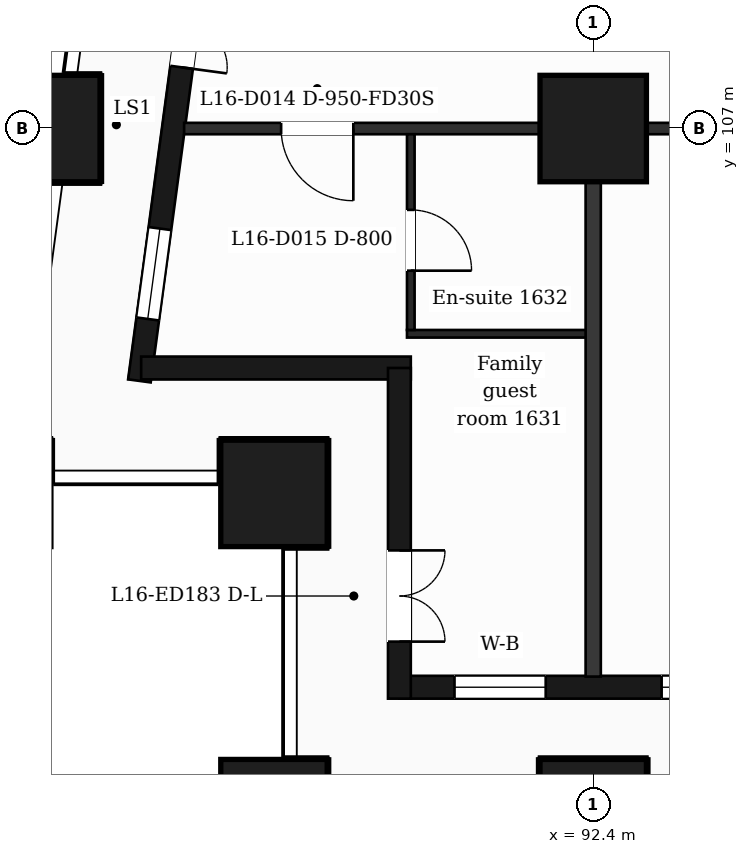
"""IFC4 building model, lengths in metres.
Left out: names, types, materials, properties, quantities, classifications, styles, units other than length and angle.
Written with IfcOpenShell. Run it as: python <this file> out.ifc"""

import sys

from ifc_helpers import new_model, si_unit, direction, frame, frame_2d, origin, origin_2d, place, context, subcontext, project, spatial, rectangle, extrude, element, fill, save


model = new_model("IFC4")
c1 = context("Model", 3, precision=1e-05, world=origin(), true_north=direction((0.0, 1.0)))
c2 = subcontext(c1, "Body", "Model", "MODEL_VIEW")
j1 = project(units=[si_unit("LENGTHUNIT", "METRE"), si_unit("PLANEANGLEUNIT", "RADIAN")], contexts=[c1])
p1 = place(None, origin())
s1 = spatial("IfcSite", under=j1, at=p1, CompositionType="ELEMENT")
p2 = place(p1, origin())
s2 = spatial("IfcBuilding", under=s1, at=p2, CompositionType="ELEMENT")
p3 = place(p2, frame((0.0, 0.0, 74.0)))
s3 = spatial("IfcBuildingStorey", under=s2, at=p3, CompositionType="ELEMENT", Elevation=74.0)
for number, where, z_axis, x_axis in (
    (1, (92.4, 98.0, 0.0), (0.0, 0.0, 1.0), (1.0, 0.0, 0.0)),
    (2, (88.2, 98.0, 0.0), (0.0, 0.0, 1.0), (1.0, 0.0, 0.0)),
    (3, (88.2, 102.2, 0.0), (0.0, 0.0, 1.0), (1.0, 0.0, 0.0)),
    (4, (92.4, 107.0, 0.0), (0.0, 0.0, 1.0), (1.0, 0.0, 0.0)),
    (5, (85.211, 107.0, 0.0), (0.0, 0.0, 1.0), (1.0, 0.0, 0.0)),
):
    element("IfcColumn", number, at=place(p3, frame(where, z_axis=z_axis, x_axis=x_axis)), inside=s3, PredefinedType="COLUMN", context=c2, shape_type="SweptSolid", body=[
        extrude(rectangle(XDim=1.4, YDim=1.4, at=origin_2d()), origin(), (0.0, 0.0, 1.0), 3.5),
    ])
p4 = place(p3, frame((89.85, 99.65, 0.0), z_axis=(0.0, 0.0, 1.0), x_axis=(1.0, 0.0, 0.0)))
e6 = element("IfcWall", 6, at=p4, inside=s3, PredefinedType="SOLIDWALL", context=c2, shape_type="SweptSolid", body=[
    extrude(rectangle(XDim=47.25, YDim=0.3, at=frame_2d((23.625, 0.0))), origin(), (0.0, 0.0, 1.0), 3.18),
])
p5 = place(p4, frame((0.725, 0.0, 0.9)))
e7 = element("IfcOpeningElement", 7, at=p5, cuts=e6, PredefinedType="OPENING", context=c2, shape_type="SweptSolid", body=[
    extrude(rectangle(XDim=1.2, YDim=2.1, at=frame_2d((0.6, 1.05))), frame((0.0, 0.16, 0.0), z_axis=(0.0, -1.0, 0.0), x_axis=(1.0, 0.0, 0.0)), (0.0, 0.0, 1.0), 0.32),
])
p6 = place(p4, frame((3.45, 0.0, 0.9)))
e8 = element("IfcOpeningElement", 8, at=p6, cuts=e6, PredefinedType="OPENING", context=c2, shape_type="SweptSolid", body=[
    extrude(rectangle(XDim=2.4, YDim=2.1, at=frame_2d((1.2, 1.05))), frame((0.0, 0.16, 0.0), z_axis=(0.0, -1.0, 0.0), x_axis=(1.0, 0.0, 0.0)), (0.0, 0.0, 1.0), 0.32),
])
p7 = place(p4, frame((7.65, 0.0, 0.9)))
e9 = element("IfcOpeningElement", 9, at=p7, cuts=e6, PredefinedType="OPENING", context=c2, shape_type="SweptSolid", body=[
    extrude(rectangle(XDim=2.4, YDim=2.1, at=frame_2d((1.2, 1.05))), frame((0.0, 0.16, 0.0), z_axis=(0.0, -1.0, 0.0), x_axis=(1.0, 0.0, 0.0)), (0.0, 0.0, 1.0), 0.32),
])
p8 = place(p4, frame((12.45, 0.0, 0.9)))
e10 = element("IfcOpeningElement", 10, at=p8, cuts=e6, PredefinedType="OPENING", context=c2, shape_type="SweptSolid", body=[
    extrude(rectangle(XDim=1.2, YDim=2.1, at=frame_2d((0.6, 1.05))), frame((0.0, 0.16, 0.0), z_axis=(0.0, -1.0, 0.0), x_axis=(1.0, 0.0, 0.0)), (0.0, 0.0, 1.0), 0.32),
])
p9 = place(p4, frame((16.65, 0.0, 0.9)))
e11 = element("IfcOpeningElement", 11, at=p9, cuts=e6, PredefinedType="OPENING", context=c2, shape_type="SweptSolid", body=[
    extrude(rectangle(XDim=1.2, YDim=2.1, at=frame_2d((0.6, 1.05))), frame((0.0, 0.16, 0.0), z_axis=(0.0, -1.0, 0.0), x_axis=(1.0, 0.0, 0.0)), (0.0, 0.0, 1.0), 0.32),
])
p10 = place(p4, frame((19.95, 0.0, 0.9)))
e12 = element("IfcOpeningElement", 12, at=p10, cuts=e6, PredefinedType="OPENING", context=c2, shape_type="SweptSolid", body=[
    extrude(rectangle(XDim=1.2, YDim=2.1, at=frame_2d((0.6, 1.05))), frame((0.0, 0.16, 0.0), z_axis=(0.0, -1.0, 0.0), x_axis=(1.0, 0.0, 0.0)), (0.0, 0.0, 1.0), 0.32),
])
p11 = place(p4, frame((21.75, 0.0, 0.9)))
e13 = element("IfcOpeningElement", 13, at=p11, cuts=e6, PredefinedType="OPENING", context=c2, shape_type="SweptSolid", body=[
    extrude(rectangle(XDim=1.2, YDim=2.1, at=frame_2d((0.6, 1.05))), frame((0.0, 0.16, 0.0), z_axis=(0.0, -1.0, 0.0), x_axis=(1.0, 0.0, 0.0)), (0.0, 0.0, 1.0), 0.32),
])
p12 = place(p4, frame((25.05, 0.0, 0.0)))
e14 = element("IfcOpeningElement", 14, at=p12, cuts=e6, PredefinedType="OPENING", context=c2, shape_type="SweptSolid", body=[
    extrude(rectangle(XDim=1.2, YDim=2.4, at=frame_2d((0.6, 1.2))), frame((0.0, 0.16, 0.0), z_axis=(0.0, -1.0, 0.0), x_axis=(1.0, 0.0, 0.0)), (0.0, 0.0, 1.0), 0.32),
])
p13 = place(p4, frame((28.35, 0.0, 0.9)))
e15 = element("IfcOpeningElement", 15, at=p13, cuts=e6, PredefinedType="OPENING", context=c2, shape_type="SweptSolid", body=[
    extrude(rectangle(XDim=1.2, YDim=2.1, at=frame_2d((0.6, 1.05))), frame((0.0, 0.16, 0.0), z_axis=(0.0, -1.0, 0.0), x_axis=(1.0, 0.0, 0.0)), (0.0, 0.0, 1.0), 0.32),
])
p14 = place(p4, frame((30.15, 0.0, 0.9)))
e16 = element("IfcOpeningElement", 16, at=p14, cuts=e6, PredefinedType="OPENING", context=c2, shape_type="SweptSolid", body=[
    extrude(rectangle(XDim=1.2, YDim=2.1, at=frame_2d((0.6, 1.05))), frame((0.0, 0.16, 0.0), z_axis=(0.0, -1.0, 0.0), x_axis=(1.0, 0.0, 0.0)), (0.0, 0.0, 1.0), 0.32),
])
p15 = place(p4, frame((32.85, 0.0, 0.9)))
e17 = element("IfcOpeningElement", 17, at=p15, cuts=e6, PredefinedType="OPENING", context=c2, shape_type="SweptSolid", body=[
    extrude(rectangle(XDim=2.4, YDim=2.1, at=frame_2d((1.2, 1.05))), frame((0.0, 0.16, 0.0), z_axis=(0.0, -1.0, 0.0), x_axis=(1.0, 0.0, 0.0)), (0.0, 0.0, 1.0), 0.32),
])
p16 = place(p4, frame((37.05, 0.0, 0.9)))
e18 = element("IfcOpeningElement", 18, at=p16, cuts=e6, PredefinedType="OPENING", context=c2, shape_type="SweptSolid", body=[
    extrude(rectangle(XDim=2.4, YDim=2.1, at=frame_2d((1.2, 1.05))), frame((0.0, 0.16, 0.0), z_axis=(0.0, -1.0, 0.0), x_axis=(1.0, 0.0, 0.0)), (0.0, 0.0, 1.0), 0.32),
])
p17 = place(p4, frame((41.85, 0.0, 0.9)))
e19 = element("IfcOpeningElement", 19, at=p17, cuts=e6, PredefinedType="OPENING", context=c2, shape_type="SweptSolid", body=[
    extrude(rectangle(XDim=1.2, YDim=2.1, at=frame_2d((0.6, 1.05))), frame((0.0, 0.16, 0.0), z_axis=(0.0, -1.0, 0.0), x_axis=(1.0, 0.0, 0.0)), (0.0, 0.0, 1.0), 0.32),
])
p18 = place(p4, frame((45.25, 0.0, 0.9)))
e20 = element("IfcOpeningElement", 20, at=p18, cuts=e6, PredefinedType="OPENING", context=c2, shape_type="SweptSolid", body=[
    extrude(rectangle(XDim=1.2, YDim=2.1, at=frame_2d((0.6, 1.05))), frame((0.0, 0.16, 0.0), z_axis=(0.0, -1.0, 0.0), x_axis=(1.0, 0.0, 0.0)), (0.0, 0.0, 1.0), 0.32),
])
p19 = place(p3, frame((87.334, 110.4, 0.0), z_axis=(0.0, 0.0, 1.0), x_axis=(-0.133437175554, -0.991057273915, 0.0)))
e21 = element("IfcWall", 21, at=p19, inside=s3, PredefinedType="SOLIDWALL", context=c2, shape_type="SweptSolid", body=[
    extrude(rectangle(XDim=6.781, YDim=0.3, at=frame_2d((3.39, 0.0))), origin(), (0.0, 0.0, 1.0), 3.18),
])
p20 = place(p19, frame((1.418, 0.0, 0.0)))
e22 = element("IfcOpeningElement", 22, at=p20, cuts=e21, PredefinedType="OPENING", context=c2, shape_type="SweptSolid", body=[
    extrude(rectangle(XDim=1.2, YDim=2.4, at=frame_2d((0.6, 1.2))), frame((0.0, 0.16, 0.0), z_axis=(0.0, -1.0, 0.0), x_axis=(1.0, 0.0, 0.0)), (0.0, 0.0, 1.0), 0.32),
])
p21 = place(p19, frame((4.758, 0.0, 0.9)))
e23 = element("IfcOpeningElement", 23, at=p21, cuts=e21, PredefinedType="OPENING", context=c2, shape_type="SweptSolid", body=[
    extrude(rectangle(XDim=1.2, YDim=2.1, at=frame_2d((0.6, 1.05))), frame((0.0, 0.16, 0.0), z_axis=(0.0, -1.0, 0.0), x_axis=(1.0, 0.0, 0.0)), (0.0, 0.0, 1.0), 0.32),
])
p22 = place(p3, frame((86.452, 103.85, 0.0), z_axis=(0.0, 0.0, 1.0), x_axis=(1.0, 0.0, 0.0)))
e24 = element("IfcWall", 24, at=p22, inside=s3, PredefinedType="SOLIDWALL", context=c2, shape_type="SweptSolid", body=[
    extrude(rectangle(XDim=3.548, YDim=0.3, at=frame_2d((1.774, 0.0))), origin(), (0.0, 0.0, 1.0), 3.18),
])
p23 = place(p3, frame((89.85, 103.85, 0.0), z_axis=(0.0, 0.0, 1.0), x_axis=(0.0, -1.0, 0.0)))
e25 = element("IfcWall", 25, at=p23, inside=s3, PredefinedType="SOLIDWALL", context=c2, shape_type="SweptSolid", body=[
    extrude(rectangle(XDim=4.35, YDim=0.3, at=frame_2d((2.175, 0.0))), origin(), (0.0, 0.0, 1.0), 3.18),
])
p24 = place(p23, frame((2.4, 0.0, 0.0)))
e26 = element("IfcOpeningElement", 26, at=p24, cuts=e25, PredefinedType="OPENING", context=c2, shape_type="SweptSolid", body=[
    extrude(rectangle(XDim=1.2, YDim=2.4, at=frame_2d((0.6, 1.2))), frame((0.0, 0.16, 0.0), z_axis=(0.0, -1.0, 0.0), x_axis=(1.0, 0.0, 0.0)), (0.0, 0.0, 1.0), 0.32),
])
p25 = place(p3, frame((89.95, 104.3, 0.0), z_axis=(0.0, 0.0, 1.0), x_axis=(1.0, 0.0, 0.0)))
e27 = element("IfcWall", 27, at=p25, inside=s3, PredefinedType="PARTITIONING", context=c2, shape_type="SweptSolid", body=[
    extrude(rectangle(XDim=2.45, YDim=0.1, at=frame_2d((1.225, 0.0))), origin(), (0.0, 0.0, 1.0), 3.18),
])
p26 = place(p3, frame((87.018, 107.0, 0.0), z_axis=(0.0, 0.0, 1.0), x_axis=(1.0, 0.0, 0.0)))
e28 = element("IfcWall", 28, at=p26, inside=s3, PredefinedType="PARTITIONING", context=c2, shape_type="SweptSolid", body=[
    extrude(rectangle(XDim=52.765, YDim=0.15, at=frame_2d((26.382, 0.0))), origin(), (0.0, 0.0, 1.0), 3.18),
])
p27 = place(p26, frame((1.276, 0.0, 0.0)))
e29 = element("IfcOpeningElement", 29, at=p27, cuts=e28, PredefinedType="OPENING", context=c2, shape_type="SweptSolid", body=[
    extrude(rectangle(XDim=0.95, YDim=2.1, at=frame_2d((0.475, 1.05))), frame((0.0, 0.085, 0.0), z_axis=(0.0, -1.0, 0.0), x_axis=(1.0, 0.0, 0.0)), (0.0, 0.0, 1.0), 0.17),
])
p28 = place(p26, frame((10.757, 0.0, 0.0)))
e30 = element("IfcOpeningElement", 30, at=p28, cuts=e28, PredefinedType="OPENING", context=c2, shape_type="SweptSolid", body=[
    extrude(rectangle(XDim=1.0, YDim=2.1, at=frame_2d((0.5, 1.05))), frame((0.0, 0.085, 0.0), z_axis=(0.0, -1.0, 0.0), x_axis=(1.0, 0.0, 0.0)), (0.0, 0.0, 1.0), 0.17),
])
p29 = place(p26, frame((23.125, 0.0, 0.0)))
e31 = element("IfcOpeningElement", 31, at=p29, cuts=e28, PredefinedType="OPENING", context=c2, shape_type="SweptSolid", body=[
    extrude(rectangle(XDim=0.95, YDim=2.1, at=frame_2d((0.475, 1.05))), frame((0.0, 0.085, 0.0), z_axis=(0.0, -1.0, 0.0), x_axis=(1.0, 0.0, 0.0)), (0.0, 0.0, 1.0), 0.17),
])
p30 = place(p26, frame((31.757, 0.0, 0.0)))
e32 = element("IfcOpeningElement", 32, at=p30, cuts=e28, PredefinedType="OPENING", context=c2, shape_type="SweptSolid", body=[
    extrude(rectangle(XDim=1.0, YDim=2.1, at=frame_2d((0.5, 1.05))), frame((0.0, 0.085, 0.0), z_axis=(0.0, -1.0, 0.0), x_axis=(1.0, 0.0, 0.0)), (0.0, 0.0, 1.0), 0.17),
])
p31 = place(p26, frame((42.819, 0.0, 0.0)))
e33 = element("IfcOpeningElement", 33, at=p31, cuts=e28, PredefinedType="OPENING", context=c2, shape_type="SweptSolid", body=[
    extrude(rectangle(XDim=0.95, YDim=2.1, at=frame_2d((0.475, 1.05))), frame((0.0, 0.085, 0.0), z_axis=(0.0, -1.0, 0.0), x_axis=(1.0, 0.0, 0.0)), (0.0, 0.0, 1.0), 0.17),
])
p32 = place(p26, frame((48.974, 0.0, 0.0)))
e34 = element("IfcOpeningElement", 34, at=p32, cuts=e28, PredefinedType="OPENING", context=c2, shape_type="SweptSolid", body=[
    extrude(rectangle(XDim=0.95, YDim=2.1, at=frame_2d((0.475, 1.05))), frame((0.0, 0.085, 0.0), z_axis=(0.0, -1.0, 0.0), x_axis=(1.0, 0.0, 0.0)), (0.0, 0.0, 1.0), 0.17),
])
p33 = place(p3, frame((90.0, 104.35, 0.0), z_axis=(0.0, 0.0, 1.0), x_axis=(0.0, 1.0, 0.0)))
e35 = element("IfcWall", 35, at=p33, inside=s3, PredefinedType="PARTITIONING", context=c2, shape_type="SweptSolid", body=[
    extrude(rectangle(XDim=2.575, YDim=0.1, at=frame_2d((1.288, 0.0))), origin(), (0.0, 0.0, 1.0), 3.18),
])
p34 = place(p33, frame((0.78, 0.0, 0.0)))
e36 = element("IfcOpeningElement", 36, at=p34, cuts=e35, PredefinedType="OPENING", context=c2, shape_type="SweptSolid", body=[
    extrude(rectangle(XDim=0.8, YDim=2.1, at=frame_2d((0.4, 1.05))), frame((0.0, 0.06, 0.0), z_axis=(0.0, -1.0, 0.0), x_axis=(1.0, 0.0, 0.0)), (0.0, 0.0, 1.0), 0.12),
])
p35 = place(p3, frame((92.4, 99.79, 0.0), z_axis=(0.0, 0.0, 1.0), x_axis=(0.0, 1.0, 0.0)))
e37 = element("IfcWall", 37, at=p35, inside=s3, PredefinedType="PARTITIONING", context=c2, shape_type="SweptSolid", body=[
    extrude(rectangle(XDim=7.135, YDim=0.2, at=frame_2d((3.567, 0.0))), origin(), (0.0, 0.0, 1.0), 3.18),
])
p36 = place(p5, origin())
e38 = element("IfcWindow", 38, at=p36, inside=s3, PartitioningType="SINGLE_PANEL", PredefinedType="WINDOW", context=c2, shape_type="SweptSolid", body=[
    extrude(rectangle(XDim=1.2, YDim=2.1, at=frame_2d((0.6, 1.05))), frame((0.0, 0.03, 0.0), z_axis=(0.0, -1.0, 0.0), x_axis=(1.0, 0.0, 0.0)), (0.0, 0.0, 1.0), 0.06),
])
fill(e7, e38)
p37 = place(p6, origin())
e39 = element("IfcWindow", 39, at=p37, inside=s3, PartitioningType="SINGLE_PANEL", PredefinedType="WINDOW", context=c2, shape_type="SweptSolid", body=[
    extrude(rectangle(XDim=2.4, YDim=2.1, at=frame_2d((1.2, 1.05))), frame((0.0, 0.03, 0.0), z_axis=(0.0, -1.0, 0.0), x_axis=(1.0, 0.0, 0.0)), (0.0, 0.0, 1.0), 0.06),
])
fill(e8, e39)
p38 = place(p20, origin())
e40 = element("IfcDoor", 40, at=p38, inside=s3, OperationType="DOUBLE_DOOR_SINGLE_SWING", PredefinedType="DOOR", context=c2, shape_type="SweptSolid", body=[
    extrude(rectangle(XDim=1.2, YDim=2.4, at=frame_2d((0.6, 1.2))), frame((0.0, 0.025, 0.0), z_axis=(0.0, -1.0, 0.0), x_axis=(1.0, 0.0, 0.0)), (0.0, 0.0, 1.0), 0.05),
])
fill(e22, e40)
p39 = place(p21, origin())
e41 = element("IfcWindow", 41, at=p39, inside=s3, PartitioningType="SINGLE_PANEL", PredefinedType="WINDOW", context=c2, shape_type="SweptSolid", body=[
    extrude(rectangle(XDim=1.2, YDim=2.1, at=frame_2d((0.6, 1.05))), frame((0.0, 0.03, 0.0), z_axis=(0.0, -1.0, 0.0), x_axis=(1.0, 0.0, 0.0)), (0.0, 0.0, 1.0), 0.06),
])
fill(e23, e41)
p40 = place(p24, origin())
e42 = element("IfcDoor", 42, at=p40, inside=s3, OperationType="DOUBLE_DOOR_SINGLE_SWING", PredefinedType="DOOR", context=c2, shape_type="SweptSolid", body=[
    extrude(rectangle(XDim=1.2, YDim=2.4, at=frame_2d((0.6, 1.2))), frame((0.0, 0.025, 0.0), z_axis=(0.0, -1.0, 0.0), x_axis=(1.0, 0.0, 0.0)), (0.0, 0.0, 1.0), 0.05),
])
fill(e26, e42)
p41 = place(p27, origin())
e43 = element("IfcDoor", 43, at=p41, inside=s3, OperationType="SINGLE_SWING_RIGHT", PredefinedType="DOOR", context=c2, shape_type="SweptSolid", body=[
    extrude(rectangle(XDim=0.95, YDim=2.1, at=frame_2d((0.475, 1.05))), frame((0.0, 0.025, 0.0), z_axis=(0.0, -1.0, 0.0), x_axis=(1.0, 0.0, 0.0)), (0.0, 0.0, 1.0), 0.05),
])
fill(e29, e43)
p42 = place(p34, origin())
e44 = element("IfcDoor", 44, at=p42, inside=s3, OperationType="SINGLE_SWING_LEFT", PredefinedType="DOOR", context=c2, shape_type="SweptSolid", body=[
    extrude(rectangle(XDim=0.8, YDim=2.1, at=frame_2d((0.4, 1.05))), frame((0.0, 0.025, 0.0), z_axis=(0.0, -1.0, 0.0), x_axis=(1.0, 0.0, 0.0)), (0.0, 0.0, 1.0), 0.05),
])
fill(e36, e44)
save(model, sys.argv[1])
